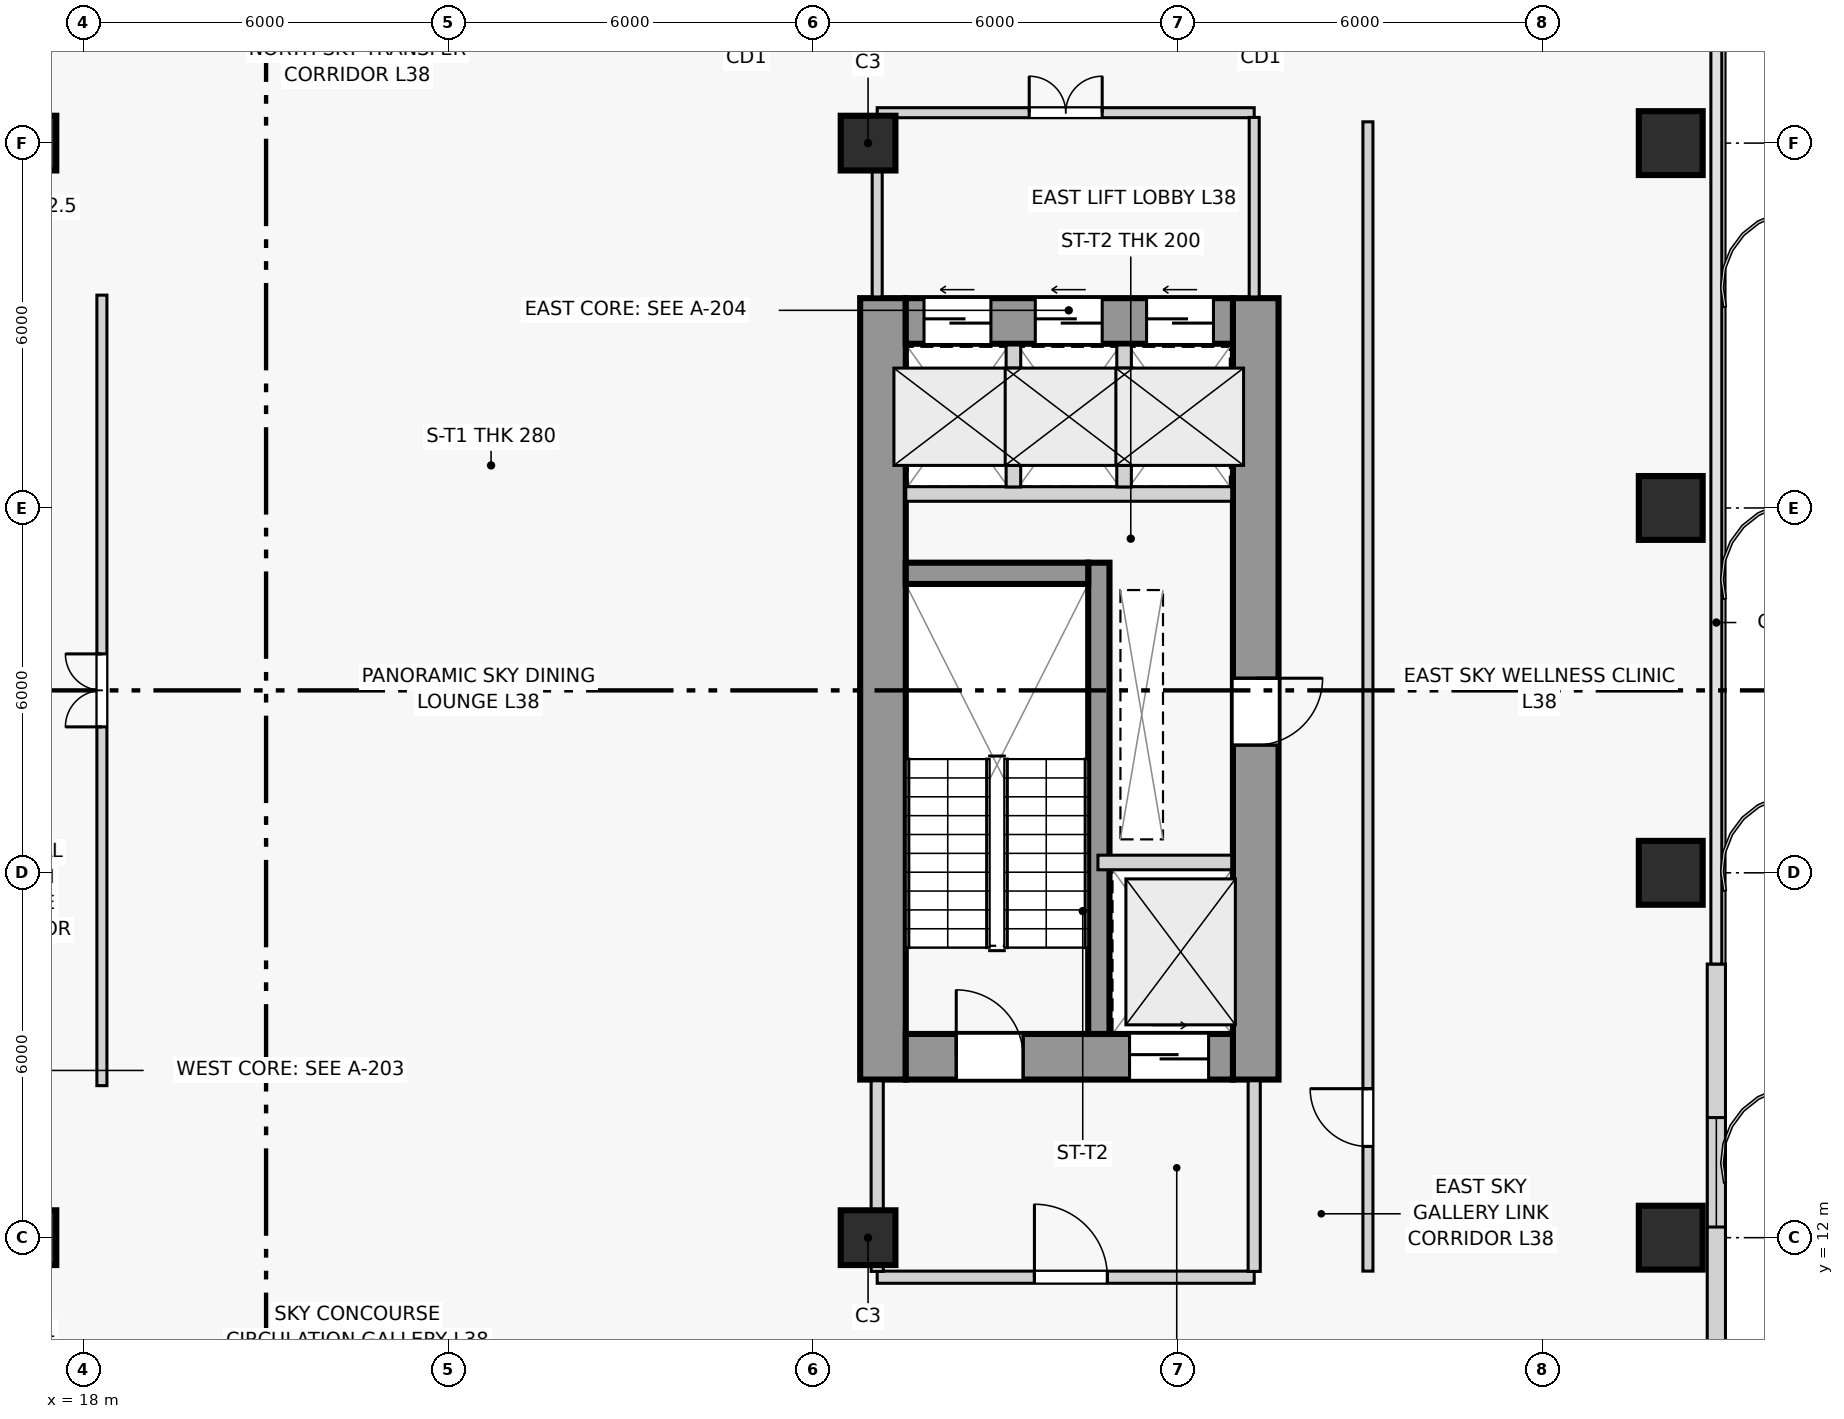
"""IFC4 building model, lengths in metres.
Left out: names, types, materials, properties, quantities, classifications, styles, units other than length and angle.
Written with IfcOpenShell. Run it as: python <this file> out.ifc"""

import sys

from ifc_helpers import new_model, si_unit, direction, frame, frame_2d, origin, origin_2d, place, context, subcontext, project, spatial, rectangle, extrude, source, transform, mapped, element, fill, save


model = new_model("IFC4")
c1 = context("Model", 3, precision=1e-05, world=origin(), true_north=direction((0.0, 1.0)))
c2 = subcontext(c1, "Body", "Model", "MODEL_VIEW")
j1 = project(units=[si_unit("LENGTHUNIT", "METRE"), si_unit("PLANEANGLEUNIT", "RADIAN")], contexts=[c1])
p1 = place(None, origin())
s1 = spatial("IfcSite", under=j1, at=p1, CompositionType="ELEMENT")
p2 = place(p1, origin())
s2 = spatial("IfcBuilding", under=s1, at=p2, CompositionType="ELEMENT")
p3 = place(p2, frame((0.0, 0.0, 144.9)))
s3 = spatial("IfcBuildingStorey", under=s2, at=p3, CompositionType="ELEMENT", Elevation=144.9)
p4 = place(p3, frame((31.145, 14.6, 0.0), z_axis=(0.0, 0.0, 1.0), x_axis=(0.0, 1.0, 0.0)))
e1 = element("IfcWall", 1, at=p4, inside=s3, PredefinedType="SHEAR", context=c2, shape_type="SweptSolid", body=[
    extrude(rectangle(XDim=12.85, YDim=0.75, at=frame_2d((6.425, 0.0))), origin(), (0.0, 0.0, 1.0), 3.6),
])
p5 = place(p3, frame((37.275, 14.6, 0.0), z_axis=(0.0, 0.0, 1.0), x_axis=(0.0, 1.0, 0.0)))
e2 = element("IfcWall", 2, at=p5, inside=s3, PredefinedType="SHEAR", context=c2, shape_type="SweptSolid", body=[
    extrude(rectangle(XDim=12.85, YDim=0.75, at=frame_2d((6.425, 0.0))), origin(), (0.0, 0.0, 1.0), 3.6),
])
p6 = place(p5, frame((5.5, 0.0, 0.0)))
e3 = element("IfcOpeningElement", 3, at=p6, cuts=e2, PredefinedType="OPENING", context=c2, shape_type="SweptSolid", body=[
    extrude(rectangle(XDim=1.1, YDim=2.2, at=frame_2d((0.55, 1.1))), frame((0.0, 0.385, 0.0), z_axis=(0.0, -1.0, 0.0), x_axis=(1.0, 0.0, 0.0)), (0.0, 0.0, 1.0), 0.77),
])
p7 = place(p3, frame((31.52, 14.975, 0.0), z_axis=(0.0, 0.0, 1.0), x_axis=(1.0, 0.0, 0.0)))
e4 = element("IfcWall", 4, at=p7, inside=s3, PredefinedType="SHEAR", context=c2, shape_type="SweptSolid", body=[
    extrude(rectangle(XDim=5.38, YDim=0.75, at=frame_2d((2.69, 0.0))), origin(), (0.0, 0.0, 1.0), 3.6),
])
p8 = place(p7, frame((0.83, 0.0, 0.0)))
e5 = element("IfcOpeningElement", 5, at=p8, cuts=e4, PredefinedType="OPENING", context=c2, shape_type="SweptSolid", body=[
    extrude(rectangle(XDim=1.1, YDim=2.2, at=frame_2d((0.55, 1.1))), frame((0.0, 0.385, 0.0), z_axis=(0.0, -1.0, 0.0), x_axis=(1.0, 0.0, 0.0)), (0.0, 0.0, 1.0), 0.77),
])
p9 = place(p7, frame((3.68, 0.0, 0.0)))
e6 = element("IfcOpeningElement", 6, at=p9, cuts=e4, PredefinedType="OPENING", context=c2, shape_type="SweptSolid", body=[
    extrude(rectangle(XDim=1.3, YDim=2.2, at=frame_2d((0.65, 1.1))), frame((0.0, 0.385, 0.0), z_axis=(0.0, -1.0, 0.0), x_axis=(1.0, 0.0, 0.0)), (0.0, 0.0, 1.0), 0.77),
])
p10 = place(p3, frame((31.52, 27.075, 0.0), z_axis=(0.0, 0.0, 1.0), x_axis=(1.0, 0.0, 0.0)))
e7 = element("IfcWall", 7, at=p10, inside=s3, PredefinedType="SHEAR", context=c2, shape_type="SweptSolid", body=[
    extrude(rectangle(XDim=5.38, YDim=0.75, at=frame_2d((2.69, 0.0))), origin(), (0.0, 0.0, 1.0), 3.6),
])
p11 = place(p10, frame((0.3, 0.0, 0.0)))
e8 = element("IfcOpeningElement", 8, at=p11, cuts=e7, PredefinedType="OPENING", context=c2, shape_type="SweptSolid", body=[
    extrude(rectangle(XDim=1.1, YDim=2.2, at=frame_2d((0.55, 1.1))), frame((0.0, 0.385, 0.0), z_axis=(0.0, -1.0, 0.0), x_axis=(1.0, 0.0, 0.0)), (0.0, 0.0, 1.0), 0.77),
])
p12 = place(p10, frame((2.13, 0.0, 0.0)))
e9 = element("IfcOpeningElement", 9, at=p12, cuts=e7, PredefinedType="OPENING", context=c2, shape_type="SweptSolid", body=[
    extrude(rectangle(XDim=1.1, YDim=2.2, at=frame_2d((0.55, 1.1))), frame((0.0, 0.385, 0.0), z_axis=(0.0, -1.0, 0.0), x_axis=(1.0, 0.0, 0.0)), (0.0, 0.0, 1.0), 0.77),
])
p13 = place(p10, frame((3.96, 0.0, 0.0)))
e10 = element("IfcOpeningElement", 10, at=p13, cuts=e7, PredefinedType="OPENING", context=c2, shape_type="SweptSolid", body=[
    extrude(rectangle(XDim=1.1, YDim=2.2, at=frame_2d((0.55, 1.1))), frame((0.0, 0.385, 0.0), z_axis=(0.0, -1.0, 0.0), x_axis=(1.0, 0.0, 0.0)), (0.0, 0.0, 1.0), 0.77),
])
p14 = place(p3, frame((34.695, 15.35, 0.0), z_axis=(0.0, 0.0, 1.0), x_axis=(0.0, 1.0, 0.0)))
e11 = element("IfcWall", 11, at=p14, inside=s3, PredefinedType="SHEAR", context=c2, shape_type="SweptSolid", body=[
    extrude(rectangle(XDim=7.75, YDim=0.35, at=frame_2d((3.875, 0.0))), origin(), (0.0, 0.0, 1.0), 3.6),
])
p15 = place(p3, frame((31.52, 22.925, 0.0), z_axis=(0.0, 0.0, 1.0), x_axis=(1.0, 0.0, 0.0)))
e12 = element("IfcWall", 12, at=p15, inside=s3, PredefinedType="SHEAR", context=c2, shape_type="SweptSolid", body=[
    extrude(rectangle(XDim=3.0, YDim=0.35, at=frame_2d((1.5, 0.0))), origin(), (0.0, 0.0, 1.0), 3.6),
])
m1 = source(origin(), c2, "Body", "SweptSolid", [
    extrude(rectangle(XDim=1.05, YDim=1.05, at=origin_2d()), origin(), (0.0, 0.0, 1.0), 3.6),
])
for number, where, z_axis, x_axis in (
    (13, (44.1, 12.0, 0.0), (0.0, 0.0, 1.0), (1.0, 0.0, 0.0)),
    (14, (44.1, 18.0, 0.0), (0.0, 0.0, 1.0), (1.0, 0.0, 0.0)),
    (15, (44.1, 24.0, 0.0), (0.0, 0.0, 1.0), (1.0, 0.0, 0.0)),
    (16, (44.1, 30.0, 0.0), (0.0, 0.0, 1.0), (1.0, 0.0, 0.0)),
):
    element("IfcColumn", number, at=place(p3, frame(where, z_axis=z_axis, x_axis=x_axis)), inside=s3, PredefinedType="COLUMN", context=c2, shape_type="MappedRepresentation", body=[
        mapped(m1, transform((0.0, 0.0, 0.0), scale=1.0)),
    ])
m2 = source(origin(), c2, "Body", "SweptSolid", [
    extrude(rectangle(XDim=0.9, YDim=0.9, at=origin_2d()), origin(), (0.0, 0.0, 1.0), 3.6),
])
for number, where, z_axis, x_axis in (
    (17, (17.1, 12.0, 0.0), (0.0, 0.0, 1.0), (1.0, 0.0, 0.0)),
    (18, (17.1, 30.0, 0.0), (0.0, 0.0, 1.0), (1.0, 0.0, 0.0)),
    (19, (30.9, 12.0, 0.0), (0.0, 0.0, 1.0), (1.0, 0.0, 0.0)),
    (20, (30.9, 30.0, 0.0), (0.0, 0.0, 1.0), (1.0, 0.0, 0.0)),
):
    element("IfcColumn", number, at=place(p3, frame(where, z_axis=z_axis, x_axis=x_axis)), inside=s3, PredefinedType="COLUMN", context=c2, shape_type="MappedRepresentation", body=[
        mapped(m2, transform((0.0, 0.0, 0.0), scale=1.0)),
    ])
p16 = place(p3, frame((44.85, 3.75, 0.0), z_axis=(0.0, 0.0, 1.0), x_axis=(0.0, 1.0, 0.0)))
e21 = element("IfcWall", 21, at=p16, inside=s3, PredefinedType="SOLIDWALL", context=c2, shape_type="SweptSolid", body=[
    extrude(rectangle(XDim=12.75, YDim=0.3, at=frame_2d((6.375, 0.0))), origin(), (0.0, 0.0, 1.0), 3.28),
])
p17 = place(p16, frame((2.15, 0.0, 0.8)))
e22 = element("IfcOpeningElement", 22, at=p17, cuts=e21, PredefinedType="OPENING", context=c2, shape_type="SweptSolid", body=[
    extrude(rectangle(XDim=1.8, YDim=2.1, at=frame_2d((0.9, 1.05))), frame((0.0, 0.16, 0.0), z_axis=(0.0, -1.0, 0.0), x_axis=(1.0, 0.0, 0.0)), (0.0, 0.0, 1.0), 0.32),
])
p18 = place(p16, frame((8.425, 0.0, 0.8)))
e23 = element("IfcOpeningElement", 23, at=p18, cuts=e21, PredefinedType="OPENING", context=c2, shape_type="SweptSolid", body=[
    extrude(rectangle(XDim=1.8, YDim=2.1, at=frame_2d((0.9, 1.05))), frame((0.0, 0.16, 0.0), z_axis=(0.0, -1.0, 0.0), x_axis=(1.0, 0.0, 0.0)), (0.0, 0.0, 1.0), 0.32),
])
p19 = place(p3, frame((34.68, 18.17, 0.0), z_axis=(0.0, 0.0, 1.0), x_axis=(1.0, 0.0, 0.0)))
e24 = element("IfcWall", 24, at=p19, inside=s3, PredefinedType="PARTITIONING", context=c2, shape_type="SweptSolid", body=[
    extrude(rectangle(XDim=2.2, YDim=0.24, at=frame_2d((1.1, 0.0))), origin(), (0.0, 0.0, 1.0), 3.28),
])
p20 = place(p3, frame((31.05, 11.35, 0.0), z_axis=(0.0, 0.0, 1.0), x_axis=(1.0, 0.0, 0.0)))
e25 = element("IfcWall", 25, at=p20, inside=s3, PredefinedType="PARTITIONING", context=c2, shape_type="SweptSolid", body=[
    extrude(rectangle(XDim=6.2, YDim=0.2, at=frame_2d((3.1, 0.0))), origin(), (0.0, 0.0, 1.0), 3.28),
])
p21 = place(p20, frame((2.586, 0.0, 0.0)))
e26 = element("IfcOpeningElement", 26, at=p21, cuts=e25, PredefinedType="OPENING", context=c2, shape_type="SweptSolid", body=[
    extrude(rectangle(XDim=1.2, YDim=2.2, at=frame_2d((0.6, 1.1))), frame((0.0, 0.11, 0.0), z_axis=(0.0, -1.0, 0.0), x_axis=(1.0, 0.0, 0.0)), (0.0, 0.0, 1.0), 0.22),
])
p22 = place(p3, frame((31.05, 11.445, 0.0), z_axis=(0.0, 0.0, 1.0), x_axis=(0.0, 1.0, 0.0)))
e27 = element("IfcWall", 27, at=p22, inside=s3, PredefinedType="PARTITIONING", context=c2, shape_type="SweptSolid", body=[
    extrude(rectangle(XDim=3.135, YDim=0.2, at=frame_2d((1.567, 0.0))), origin(), (0.0, 0.0, 1.0), 2.736),
])
p23 = place(p3, frame((37.25, 11.445, 0.0), z_axis=(0.0, 0.0, 1.0), x_axis=(0.0, 1.0, 0.0)))
e28 = element("IfcWall", 28, at=p23, inside=s3, PredefinedType="PARTITIONING", context=c2, shape_type="SweptSolid", body=[
    extrude(rectangle(XDim=3.135, YDim=0.2, at=frame_2d((1.567, 0.0))), origin(), (0.0, 0.0, 1.0), 3.28),
])
p24 = place(p3, frame((31.52, 24.23, 0.0), z_axis=(0.0, 0.0, 1.0), x_axis=(1.0, 0.0, 0.0)))
e29 = element("IfcWall", 29, at=p24, inside=s3, PredefinedType="PARTITIONING", context=c2, shape_type="SweptSolid", body=[
    extrude(rectangle(XDim=5.36, YDim=0.24, at=frame_2d((2.68, 0.0))), origin(), (0.0, 0.0, 1.0), 3.28),
])
for number, where, z_axis, x_axis in (
    (30, (33.29, 24.345, 0.0), (0.0, 0.0, 1.0), (0.0, 1.0, 0.0)),
    (31, (35.11, 24.345, 0.0), (0.0, 0.0, 1.0), (0.0, 1.0, 0.0)),
):
    element("IfcWall", number, at=place(p3, frame(where, z_axis=z_axis, x_axis=x_axis)), inside=s3, PredefinedType="PARTITIONING", context=c2, shape_type="SweptSolid", body=[
        extrude(rectangle(XDim=2.335, YDim=0.24, at=frame_2d((1.167, 0.0))), origin(), (0.0, 0.0, 1.0), 3.28),
    ])
p25 = place(p3, frame((31.05, 30.5, 0.0), z_axis=(0.0, 0.0, 1.0), x_axis=(1.0, 0.0, 0.0)))
e32 = element("IfcWall", 32, at=p25, inside=s3, PredefinedType="PARTITIONING", context=c2, shape_type="SweptSolid", body=[
    extrude(rectangle(XDim=6.2, YDim=0.165, at=frame_2d((3.1, 0.0))), origin(), (0.0, 0.0, 1.0), 3.28),
])
p26 = place(p25, frame((2.5, 0.0, 0.0)))
e33 = element("IfcOpeningElement", 33, at=p26, cuts=e32, PredefinedType="OPENING", context=c2, shape_type="SweptSolid", body=[
    extrude(rectangle(XDim=1.2, YDim=2.2, at=frame_2d((0.6, 1.1))), frame((0.0, 0.093, 0.0), z_axis=(0.0, -1.0, 0.0), x_axis=(1.0, 0.0, 0.0)), (0.0, 0.0, 1.0), 0.185),
])
p27 = place(p3, frame((31.05, 27.47, 0.0), z_axis=(0.0, 0.0, 1.0), x_axis=(0.0, 1.0, 0.0)))
e34 = element("IfcWall", 34, at=p27, inside=s3, PredefinedType="PARTITIONING", context=c2, shape_type="SweptSolid", body=[
    extrude(rectangle(XDim=2.953, YDim=0.165, at=frame_2d((1.476, 0.0))), origin(), (0.0, 0.0, 1.0), 2.736),
])
p28 = place(p3, frame((37.25, 27.47, 0.0), z_axis=(0.0, 0.0, 1.0), x_axis=(0.0, 1.0, 0.0)))
e35 = element("IfcWall", 35, at=p28, inside=s3, PredefinedType="PARTITIONING", context=c2, shape_type="SweptSolid", body=[
    extrude(rectangle(XDim=2.953, YDim=0.165, at=frame_2d((1.476, 0.0))), origin(), (0.0, 0.0, 1.0), 3.28),
])
p29 = place(p3, frame((39.12, 11.45, 0.0), z_axis=(0.0, 0.0, 1.0), x_axis=(0.0, 1.0, 0.0)))
e36 = element("IfcWall", 36, at=p29, inside=s3, PredefinedType="PARTITIONING", context=c2, shape_type="SweptSolid", body=[
    extrude(rectangle(XDim=18.9, YDim=0.165, at=frame_2d((9.45, 0.0))), origin(), (0.0, 0.0, 1.0), 3.28),
])
p30 = place(p29, frame((2.05, 0.0, 0.0)))
e37 = element("IfcOpeningElement", 37, at=p30, cuts=e36, PredefinedType="OPENING", context=c2, shape_type="SweptSolid", body=[
    extrude(rectangle(XDim=0.95, YDim=2.1, at=frame_2d((0.475, 1.05))), frame((0.0, 0.093, 0.0), z_axis=(0.0, -1.0, 0.0), x_axis=(1.0, 0.0, 0.0)), (0.0, 0.0, 1.0), 0.185),
])
p31 = place(p3, frame((18.3, 14.5, 0.0), z_axis=(0.0, 0.0, 1.0), x_axis=(0.0, 1.0, 0.0)))
e38 = element("IfcWall", 38, at=p31, inside=s3, PredefinedType="PARTITIONING", context=c2, shape_type="SweptSolid", body=[
    extrude(rectangle(XDim=13.0, YDim=0.165, at=frame_2d((6.5, 0.0))), origin(), (0.0, 0.0, 1.0), 3.28),
])
p32 = place(p31, frame((5.9, 0.0, 0.0)))
e39 = element("IfcOpeningElement", 39, at=p32, cuts=e38, PredefinedType="OPENING", context=c2, shape_type="SweptSolid", body=[
    extrude(rectangle(XDim=1.2, YDim=2.2, at=frame_2d((0.6, 1.1))), frame((0.0, 0.093, 0.0), z_axis=(0.0, -1.0, 0.0), x_axis=(1.0, 0.0, 0.0)), (0.0, 0.0, 1.0), 0.185),
])
m3 = source(origin(), c2, "Body", "SweptSolid", [
    extrude(rectangle(XDim=1.8, YDim=2.1, at=frame_2d((0.9, 1.05))), frame((0.0, 0.03, 0.0), z_axis=(0.0, -1.0, 0.0), x_axis=(1.0, 0.0, 0.0)), (0.0, 0.0, 1.0), 0.06),
])
p33 = place(p18, origin())
e40 = element("IfcWindow", 40, at=p33, inside=s3, PartitioningType="SINGLE_PANEL", PredefinedType="WINDOW", context=c2, shape_type="MappedRepresentation", body=[
    mapped(m3, transform((0.0, 0.0, 0.0), scale=1.0)),
])
fill(e23, e40)
m4 = source(origin(), c2, "Body", "SweptSolid", [
    extrude(rectangle(XDim=1.1, YDim=2.2, at=frame_2d((0.55, 1.1))), frame((0.0, 0.025, 0.0), z_axis=(0.0, -1.0, 0.0), x_axis=(1.0, 0.0, 0.0)), (0.0, 0.0, 1.0), 0.05),
])
p34 = place(p8, origin())
e41 = element("IfcDoor", 41, at=p34, inside=s3, OperationType="SINGLE_SWING_LEFT", PredefinedType="DOOR", context=c2, shape_type="MappedRepresentation", body=[
    mapped(m4, transform((0.0, 0.0, 0.0), scale=1.0)),
])
fill(e5, e41)
m5 = source(origin(), c2, "Body", "SweptSolid", [
    extrude(rectangle(XDim=1.3, YDim=2.2, at=frame_2d((0.65, 1.1))), frame((0.0, 0.025, 0.0), z_axis=(0.0, -1.0, 0.0), x_axis=(1.0, 0.0, 0.0)), (0.0, 0.0, 1.0), 0.05),
])
p35 = place(p9, origin())
e42 = element("IfcDoor", 42, at=p35, inside=s3, OperationType="SLIDING_TO_RIGHT", PredefinedType="DOOR", context=c2, shape_type="MappedRepresentation", body=[
    mapped(m5, transform((0.0, 0.0, 0.0), scale=1.0)),
])
fill(e6, e42)
m6 = source(origin(), c2, "Body", "SweptSolid", [
    extrude(rectangle(XDim=1.2, YDim=2.2, at=frame_2d((0.6, 1.1))), frame((0.0, 0.025, 0.0), z_axis=(0.0, -1.0, 0.0), x_axis=(1.0, 0.0, 0.0)), (0.0, 0.0, 1.0), 0.05),
])
p36 = place(p21, origin())
e43 = element("IfcDoor", 43, at=p36, inside=s3, OperationType="SINGLE_SWING_LEFT", PredefinedType="DOOR", context=c2, shape_type="MappedRepresentation", body=[
    mapped(m6, transform((0.0, 0.0, 0.0), scale=1.0)),
])
fill(e26, e43)
m7 = source(origin(), c2, "Body", "SweptSolid", [
    extrude(rectangle(XDim=1.1, YDim=2.2, at=frame_2d((0.55, 1.1))), frame((0.0, 0.025, 0.0), z_axis=(0.0, -1.0, 0.0), x_axis=(1.0, 0.0, 0.0)), (0.0, 0.0, 1.0), 0.05),
])
p37 = place(p11, origin())
e44 = element("IfcDoor", 44, at=p37, inside=s3, OperationType="SLIDING_TO_LEFT", PredefinedType="DOOR", context=c2, shape_type="MappedRepresentation", body=[
    mapped(m7, transform((0.0, 0.0, 0.0), scale=1.0)),
])
fill(e8, e44)
p38 = place(p12, origin())
e45 = element("IfcDoor", 45, at=p38, inside=s3, OperationType="SLIDING_TO_LEFT", PredefinedType="DOOR", context=c2, shape_type="MappedRepresentation", body=[
    mapped(m7, transform((0.0, 0.0, 0.0), scale=1.0)),
])
fill(e9, e45)
p39 = place(p13, origin())
e46 = element("IfcDoor", 46, at=p39, inside=s3, OperationType="SLIDING_TO_LEFT", PredefinedType="DOOR", context=c2, shape_type="MappedRepresentation", body=[
    mapped(m7, transform((0.0, 0.0, 0.0), scale=1.0)),
])
fill(e10, e46)
p40 = place(p26, origin())
e47 = element("IfcDoor", 47, at=p40, inside=s3, OperationType="DOUBLE_DOOR_SINGLE_SWING", PredefinedType="DOOR", context=c2, shape_type="MappedRepresentation", body=[
    mapped(m6, transform((0.0, 0.0, 0.0), scale=1.0)),
])
fill(e33, e47)
p41 = place(p6, frame((1.1, 0.0, 0.0), z_axis=(0.0, 0.0, 1.0), x_axis=(-1.0, 0.0, 0.0)))
e48 = element("IfcDoor", 48, at=p41, inside=s3, OperationType="SINGLE_SWING_LEFT", PredefinedType="DOOR", context=c2, shape_type="MappedRepresentation", body=[
    mapped(m4, transform((0.0, 0.0, 0.0), scale=1.0)),
])
fill(e3, e48)
p42 = place(p32, origin())
e49 = element("IfcDoor", 49, at=p42, inside=s3, OperationType="DOUBLE_DOOR_SINGLE_SWING", PredefinedType="DOOR", context=c2, shape_type="MappedRepresentation", body=[
    mapped(m6, transform((0.0, 0.0, 0.0), scale=1.0)),
])
fill(e39, e49)
m8 = source(origin(), c2, "Body", "SweptSolid", [
    extrude(rectangle(XDim=0.95, YDim=2.1, at=frame_2d((0.475, 1.05))), frame((0.0, 0.025, 0.0), z_axis=(0.0, -1.0, 0.0), x_axis=(1.0, 0.0, 0.0)), (0.0, 0.0, 1.0), 0.05),
])
p43 = place(p30, origin())
e50 = element("IfcDoor", 50, at=p43, inside=s3, OperationType="SINGLE_SWING_RIGHT", PredefinedType="DOOR", context=c2, shape_type="MappedRepresentation", body=[
    mapped(m8, transform((0.0, 0.0, 0.0), scale=1.0)),
])
fill(e37, e50)
save(model, sys.argv[1])
